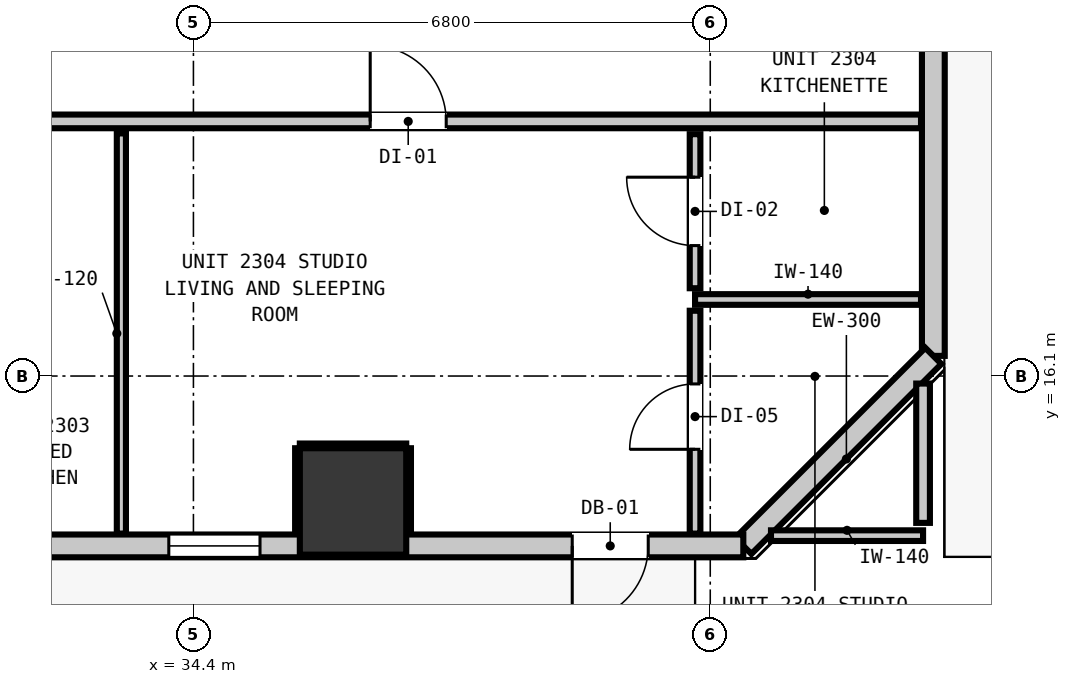
"""IFC4 building model, lengths in metres.
Left out: names, types, materials, properties, quantities, classifications, styles, units other than length and angle.
Written with IfcOpenShell. Run it as: python <this file> out.ifc"""

import sys

from ifc_helpers import new_model, si_unit, direction, frame, frame_2d, origin, origin_2d, place, context, subcontext, project, spatial, rectangle, extrude, element, fill, save


model = new_model("IFC4")
c1 = context("Model", 3, precision=1e-05, world=origin(), true_north=direction((0.0, 1.0)))
c2 = subcontext(c1, "Body", "Model", "MODEL_VIEW")
j1 = project(units=[si_unit("LENGTHUNIT", "METRE"), si_unit("PLANEANGLEUNIT", "RADIAN")], contexts=[c1])
p1 = place(None, origin())
s1 = spatial("IfcSite", under=j1, at=p1, CompositionType="ELEMENT")
p2 = place(p1, origin())
s2 = spatial("IfcBuilding", under=s1, at=p2, CompositionType="ELEMENT")
p3 = place(p2, frame((0.0, 0.0, 81.76)))
s3 = spatial("IfcBuildingStorey", under=s2, at=p3, CompositionType="ELEMENT", Elevation=81.76)
p4 = place(p3, frame((36.5, 14.45, -0.2), z_axis=(0.0, 0.0, 1.0), x_axis=(1.0, 0.0, 0.0)))
e1 = element("IfcColumn", 1, at=p4, inside=s3, PredefinedType="COLUMN", context=c2, shape_type="SweptSolid", body=[
    extrude(rectangle(XDim=1.4, YDim=1.4, at=origin_2d()), origin(), (0.0, 0.0, 1.0), 3.52),
])
p5 = place(p3, frame((44.135, 51.035, 0.0), z_axis=(0.0, 0.0, 1.0), x_axis=(0.0, -1.0, 0.0)))
e2 = element("IfcWall", 2, at=p5, inside=s3, PredefinedType="STANDARD", context=c2, shape_type="SweptSolid", body=[
    extrude(rectangle(XDim=34.67, YDim=0.3, at=frame_2d((17.335, 0.0))), origin(), (0.0, 0.0, 1.0), 3.06),
])
p6 = place(p5, frame((0.501, 0.0, 0.0)))
e3 = element("IfcOpeningElement", 3, at=p6, cuts=e2, PredefinedType="OPENING", context=c2, shape_type="SweptSolid", body=[
    extrude(rectangle(XDim=1.1, YDim=2.15, at=frame_2d((0.55, 1.075))), frame((0.0, 0.16, 0.0), z_axis=(0.0, -1.0, 0.0), x_axis=(1.0, 0.0, 0.0)), (0.0, 0.0, 1.0), 0.32),
])
p7 = place(p5, frame((1.978, 0.0, 0.85)))
e4 = element("IfcOpeningElement", 4, at=p7, cuts=e2, PredefinedType="OPENING", context=c2, shape_type="SweptSolid", body=[
    extrude(rectangle(XDim=0.58, YDim=1.5, at=frame_2d((0.29, 0.75))), frame((0.0, 0.16, 0.0), z_axis=(0.0, -1.0, 0.0), x_axis=(1.0, 0.0, 0.0)), (0.0, 0.0, 1.0), 0.32),
])
p8 = place(p5, frame((26.335, 0.0, 0.85)))
e5 = element("IfcOpeningElement", 5, at=p8, cuts=e2, PredefinedType="OPENING", context=c2, shape_type="SweptSolid", body=[
    extrude(rectangle(XDim=1.2, YDim=1.8, at=frame_2d((0.6, 0.9))), frame((0.0, 0.16, 0.0), z_axis=(0.0, -1.0, 0.0), x_axis=(1.0, 0.0, 0.0)), (0.0, 0.0, 1.0), 0.32),
])
p9 = place(p5, frame((13.551, 0.0, 0.85)))
e6 = element("IfcOpeningElement", 6, at=p9, cuts=e2, PredefinedType="OPENING", context=c2, shape_type="SweptSolid", body=[
    extrude(rectangle(XDim=1.2, YDim=1.8, at=frame_2d((0.6, 0.9))), frame((0.0, 0.16, 0.0), z_axis=(0.0, -1.0, 0.0), x_axis=(1.0, 0.0, 0.0)), (0.0, 0.0, 1.0), 0.32),
])
p10 = place(p3, frame((44.135, 16.365, 0.0), z_axis=(0.0, 0.0, 1.0), x_axis=(-0.707106781187, -0.707106781187, 0.0)))
e7 = element("IfcWall", 7, at=p10, inside=s3, PredefinedType="STANDARD", context=c2, shape_type="SweptSolid", body=[
    extrude(rectangle(XDim=3.536, YDim=0.3, at=frame_2d((1.768, 0.0))), origin(), (0.0, 0.0, 1.0), 3.06),
])
p11 = place(p3, frame((41.635, 13.865, 0.0), z_axis=(0.0, 0.0, 1.0), x_axis=(-1.0, 0.0, 0.0)))
e8 = element("IfcWall", 8, at=p11, inside=s3, PredefinedType="STANDARD", context=c2, shape_type="SweptSolid", body=[
    extrude(rectangle(XDim=37.47, YDim=0.3, at=frame_2d((18.735, 0.0))), origin(), (0.0, 0.0, 1.0), 3.06),
])
p12 = place(p11, frame((1.251, 0.0, 0.0)))
e9 = element("IfcOpeningElement", 9, at=p12, cuts=e8, PredefinedType="OPENING", context=c2, shape_type="SweptSolid", body=[
    extrude(rectangle(XDim=1.0, YDim=2.15, at=frame_2d((0.5, 1.075))), frame((0.0, 0.16, 0.0), z_axis=(0.0, -1.0, 0.0), x_axis=(1.0, 0.0, 0.0)), (0.0, 0.0, 1.0), 0.32),
])
p13 = place(p11, frame((32.235, 0.0, 0.85)))
e10 = element("IfcOpeningElement", 10, at=p13, cuts=e8, PredefinedType="OPENING", context=c2, shape_type="SweptSolid", body=[
    extrude(rectangle(XDim=1.2, YDim=1.8, at=frame_2d((0.6, 0.9))), frame((0.0, 0.16, 0.0), z_axis=(0.0, -1.0, 0.0), x_axis=(1.0, 0.0, 0.0)), (0.0, 0.0, 1.0), 0.32),
])
p14 = place(p11, frame((21.774, 0.0, 0.85)))
e11 = element("IfcOpeningElement", 11, at=p14, cuts=e8, PredefinedType="OPENING", context=c2, shape_type="SweptSolid", body=[
    extrude(rectangle(XDim=0.58, YDim=1.5, at=frame_2d((0.29, 0.75))), frame((0.0, 0.16, 0.0), z_axis=(0.0, -1.0, 0.0), x_axis=(1.0, 0.0, 0.0)), (0.0, 0.0, 1.0), 0.32),
])
p15 = place(p11, frame((23.963, 0.0, 0.85)))
e12 = element("IfcOpeningElement", 12, at=p15, cuts=e8, PredefinedType="OPENING", context=c2, shape_type="SweptSolid", body=[
    extrude(rectangle(XDim=1.2, YDim=1.8, at=frame_2d((0.6, 0.9))), frame((0.0, 0.16, 0.0), z_axis=(0.0, -1.0, 0.0), x_axis=(1.0, 0.0, 0.0)), (0.0, 0.0, 1.0), 0.32),
])
p16 = place(p11, frame((10.64, 0.0, 0.85)))
e13 = element("IfcOpeningElement", 13, at=p16, cuts=e8, PredefinedType="OPENING", context=c2, shape_type="SweptSolid", body=[
    extrude(rectangle(XDim=0.9, YDim=1.5, at=frame_2d((0.45, 0.75))), frame((0.0, 0.16, 0.0), z_axis=(0.0, -1.0, 0.0), x_axis=(1.0, 0.0, 0.0)), (0.0, 0.0, 1.0), 0.32),
])
p17 = place(p11, frame((14.959, 0.0, 0.85)))
e14 = element("IfcOpeningElement", 14, at=p17, cuts=e8, PredefinedType="OPENING", context=c2, shape_type="SweptSolid", body=[
    extrude(rectangle(XDim=1.2, YDim=1.8, at=frame_2d((0.6, 0.9))), frame((0.0, 0.16, 0.0), z_axis=(0.0, -1.0, 0.0), x_axis=(1.0, 0.0, 0.0)), (0.0, 0.0, 1.0), 0.32),
])
p18 = place(p11, frame((6.359, 0.0, 0.85)))
e15 = element("IfcOpeningElement", 15, at=p18, cuts=e8, PredefinedType="OPENING", context=c2, shape_type="SweptSolid", body=[
    extrude(rectangle(XDim=1.2, YDim=1.8, at=frame_2d((0.6, 0.9))), frame((0.0, 0.16, 0.0), z_axis=(0.0, -1.0, 0.0), x_axis=(1.0, 0.0, 0.0)), (0.0, 0.0, 1.0), 0.32),
])
p19 = place(p3, frame((12.993, 19.45, 0.0), z_axis=(0.0, 0.0, 1.0), x_axis=(1.0, 0.0, 0.0)))
e16 = element("IfcWall", 16, at=p19, inside=s3, PredefinedType="PARTITIONING", context=c2, shape_type="SweptSolid", body=[
    extrude(rectangle(XDim=30.98, YDim=0.18, at=frame_2d((15.49, 0.0))), origin(), (0.0, 0.0, 1.0), 3.06),
])
p20 = place(p19, frame((6.788, 0.0, 0.0)))
e17 = element("IfcOpeningElement", 17, at=p20, cuts=e16, PredefinedType="OPENING", context=c2, shape_type="SweptSolid", body=[
    extrude(rectangle(XDim=1.0, YDim=2.15, at=frame_2d((0.5, 1.075))), frame((0.0, 0.1, 0.0), z_axis=(0.0, -1.0, 0.0), x_axis=(1.0, 0.0, 0.0)), (0.0, 0.0, 1.0), 0.2),
])
p21 = place(p19, frame((16.356, 0.0, 0.0)))
e18 = element("IfcOpeningElement", 18, at=p21, cuts=e16, PredefinedType="OPENING", context=c2, shape_type="SweptSolid", body=[
    extrude(rectangle(XDim=1.0, YDim=2.15, at=frame_2d((0.5, 1.075))), frame((0.0, 0.1, 0.0), z_axis=(0.0, -1.0, 0.0), x_axis=(1.0, 0.0, 0.0)), (0.0, 0.0, 1.0), 0.2),
])
p22 = place(p19, frame((23.733, 0.0, 0.0)))
e19 = element("IfcOpeningElement", 19, at=p22, cuts=e16, PredefinedType="OPENING", context=c2, shape_type="SweptSolid", body=[
    extrude(rectangle(XDim=1.0, YDim=2.15, at=frame_2d((0.5, 1.075))), frame((0.0, 0.1, 0.0), z_axis=(0.0, -1.0, 0.0), x_axis=(1.0, 0.0, 0.0)), (0.0, 0.0, 1.0), 0.2),
])
p23 = place(p3, frame((41.999, 14.0, 0.0), z_axis=(0.0, 0.0, 1.0), x_axis=(1.0, 0.0, 0.0)))
e20 = element("IfcWall", 20, at=p23, inside=s3, PredefinedType="PARTITIONING", context=c2, shape_type="SweptSolid", body=[
    extrude(rectangle(XDim=2.001, YDim=0.14, at=frame_2d((1.0, 0.0))), origin(), (0.0, 0.0, 1.0), 3.06),
])
p24 = place(p3, frame((41.0, 17.107, 0.0), z_axis=(0.0, 0.0, 1.0), x_axis=(1.0, 0.0, 0.0)))
e21 = element("IfcWall", 21, at=p24, inside=s3, PredefinedType="PARTITIONING", context=c2, shape_type="SweptSolid", body=[
    extrude(rectangle(XDim=2.973, YDim=0.14, at=frame_2d((1.486, 0.0))), origin(), (0.0, 0.0, 1.0), 3.06),
])
p25 = place(p3, frame((44.0, 14.168, 0.0), z_axis=(0.0, 0.0, 1.0), x_axis=(0.0, 1.0, 0.0)))
e22 = element("IfcWall", 22, at=p25, inside=s3, PredefinedType="PARTITIONING", context=c2, shape_type="SweptSolid", body=[
    extrude(rectangle(XDim=1.833, YDim=0.18, at=frame_2d((0.917, 0.0))), origin(), (0.0, 0.0, 1.0), 3.06),
])
p26 = place(p3, frame((41.0, 14.027, 0.0), z_axis=(0.0, 0.0, 1.0), x_axis=(0.0, 1.0, 0.0)))
e23 = element("IfcWall", 23, at=p26, inside=s3, PredefinedType="PARTITIONING", context=c2, shape_type="SweptSolid", body=[
    extrude(rectangle(XDim=2.932, YDim=0.14, at=frame_2d((1.466, 0.0))), origin(), (0.0, 0.0, 1.0), 3.06),
])
p27 = place(p26, frame((1.109, 0.0, 0.0)))
e24 = element("IfcOpeningElement", 24, at=p27, cuts=e23, PredefinedType="OPENING", context=c2, shape_type="SweptSolid", body=[
    extrude(rectangle(XDim=0.86, YDim=2.02, at=frame_2d((0.43, 1.01))), frame((0.0, 0.08, 0.0), z_axis=(0.0, -1.0, 0.0), x_axis=(1.0, 0.0, 0.0)), (0.0, 0.0, 1.0), 0.16),
])
p28 = place(p3, frame((41.0, 17.255, 0.0), z_axis=(0.0, 0.0, 1.0), x_axis=(0.0, 1.0, 0.0)))
e25 = element("IfcWall", 25, at=p28, inside=s3, PredefinedType="PARTITIONING", context=c2, shape_type="SweptSolid", body=[
    extrude(rectangle(XDim=2.027, YDim=0.14, at=frame_2d((1.014, 0.0))), origin(), (0.0, 0.0, 1.0), 3.06),
])
p29 = place(p28, frame((0.561, 0.0, 0.0)))
e26 = element("IfcOpeningElement", 26, at=p29, cuts=e25, PredefinedType="OPENING", context=c2, shape_type="SweptSolid", body=[
    extrude(rectangle(XDim=0.9, YDim=2.1, at=frame_2d((0.45, 1.05))), frame((0.0, 0.08, 0.0), z_axis=(0.0, -1.0, 0.0), x_axis=(1.0, 0.0, 0.0)), (0.0, 0.0, 1.0), 0.16),
])
p30 = place(p3, frame((33.452, 14.027, 0.0), z_axis=(0.0, 0.0, 1.0), x_axis=(0.0, 1.0, 0.0)))
e27 = element("IfcWall", 27, at=p30, inside=s3, PredefinedType="PARTITIONING", context=c2, shape_type="SweptSolid", body=[
    extrude(rectangle(XDim=5.265, YDim=0.12, at=frame_2d((2.632, 0.0))), origin(), (0.0, 0.0, 1.0), 3.06),
])
p31 = place(p3, frame((35.8, 15.182, 0.0), z_axis=(0.0, 0.0, 1.0), x_axis=(1.0, 0.0, 0.0)))
e28 = element("IfcWall", 28, at=p31, inside=s3, PredefinedType="PARTITIONING", context=c2, shape_type="SweptSolid", body=[
    extrude(rectangle(XDim=1.4, YDim=0.06, at=frame_2d((0.7, 0.0))), origin(), (0.0, 0.0, 1.0), 1.45),
])
for number, where, z_axis, x_axis in (
    (29, (35.768, 14.03, 0.0), (0.0, 0.0, 1.0), (0.0, 1.0, 0.0)),
    (30, (37.232, 14.03, 0.0), (0.0, 0.0, 1.0), (0.0, 1.0, 0.0)),
):
    element("IfcWall", number, at=place(p3, frame(where, z_axis=z_axis, x_axis=x_axis)), inside=s3, PredefinedType="PARTITIONING", context=c2, shape_type="SweptSolid", body=[
        extrude(rectangle(XDim=1.12, YDim=0.06, at=frame_2d((0.56, 0.0))), origin(), (0.0, 0.0, 1.0), 1.45),
    ])
p32 = place(p12, origin())
e31 = element("IfcDoor", 31, at=p32, inside=s3, OperationType="SINGLE_SWING_RIGHT", PredefinedType="DOOR", context=c2, shape_type="SweptSolid", body=[
    extrude(rectangle(XDim=1.0, YDim=2.15, at=frame_2d((0.5, 1.075))), frame((0.0, 0.025, 0.0), z_axis=(0.0, -1.0, 0.0), x_axis=(1.0, 0.0, 0.0)), (0.0, 0.0, 1.0), 0.05),
])
fill(e9, e31)
p33 = place(p18, origin())
e32 = element("IfcWindow", 32, at=p33, inside=s3, PartitioningType="SINGLE_PANEL", PredefinedType="WINDOW", context=c2, shape_type="SweptSolid", body=[
    extrude(rectangle(XDim=1.2, YDim=1.8, at=frame_2d((0.6, 0.9))), frame((0.0, 0.03, 0.0), z_axis=(0.0, -1.0, 0.0), x_axis=(1.0, 0.0, 0.0)), (0.0, 0.0, 1.0), 0.06),
])
fill(e15, e32)
p34 = place(p22, origin())
e33 = element("IfcDoor", 33, at=p34, inside=s3, OperationType="SINGLE_SWING_LEFT", PredefinedType="DOOR", context=c2, shape_type="SweptSolid", body=[
    extrude(rectangle(XDim=1.0, YDim=2.15, at=frame_2d((0.5, 1.075))), frame((0.0, 0.025, 0.0), z_axis=(0.0, -1.0, 0.0), x_axis=(1.0, 0.0, 0.0)), (0.0, 0.0, 1.0), 0.05),
])
fill(e19, e33)
p35 = place(p29, origin())
e34 = element("IfcDoor", 34, at=p35, inside=s3, OperationType="SINGLE_SWING_RIGHT", PredefinedType="DOOR", context=c2, shape_type="SweptSolid", body=[
    extrude(rectangle(XDim=0.9, YDim=2.1, at=frame_2d((0.45, 1.05))), frame((0.0, 0.025, 0.0), z_axis=(0.0, -1.0, 0.0), x_axis=(1.0, 0.0, 0.0)), (0.0, 0.0, 1.0), 0.05),
])
fill(e26, e34)
p36 = place(p27, origin())
e35 = element("IfcDoor", 35, at=p36, inside=s3, OperationType="SINGLE_SWING_LEFT", PredefinedType="DOOR", context=c2, shape_type="SweptSolid", body=[
    extrude(rectangle(XDim=0.86, YDim=2.02, at=frame_2d((0.43, 1.01))), frame((0.0, 0.025, 0.0), z_axis=(0.0, -1.0, 0.0), x_axis=(1.0, 0.0, 0.0)), (0.0, 0.0, 1.0), 0.05),
])
fill(e24, e35)
save(model, sys.argv[1])
